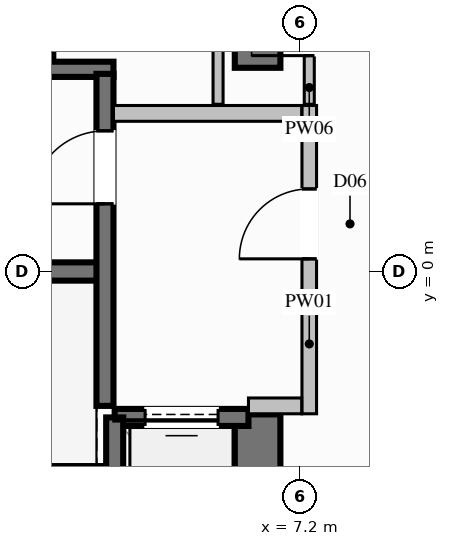
"""IFC4 building model, lengths in metres.
Left out: names, types, materials, properties, quantities, classifications, styles, units other than length and angle.
Written with IfcOpenShell. Run it as: python <this file> out.ifc"""

import sys

from ifc_helpers import new_model, si_unit, direction, frame, frame_2d, origin, place, context, subcontext, project, spatial, rectangle, extrude, element, fill, save


model = new_model("IFC4")
c1 = context("Model", 3, precision=1e-05, world=origin(), true_north=direction((0.0, 1.0)))
c2 = subcontext(c1, "Body", "Model", "MODEL_VIEW")
j1 = project(units=[si_unit("LENGTHUNIT", "METRE"), si_unit("PLANEANGLEUNIT", "RADIAN")], contexts=[c1])
p1 = place(None, origin())
s1 = spatial("IfcSite", under=j1, at=p1, CompositionType="ELEMENT")
p2 = place(p1, origin())
s2 = spatial("IfcBuilding", under=s1, at=p2, CompositionType="ELEMENT")
p3 = place(p2, frame((0.0, 0.0, 71.6)))
s3 = spatial("IfcBuildingStorey", under=s2, at=p3, CompositionType="ELEMENT", Elevation=71.6)
p4 = place(p3, frame((-3.99, 0.0, 0.0), z_axis=(0.0, 0.0, 1.0), x_axis=(1.0, 0.0, 0.0)))
e1 = element("IfcWall", 1, at=p4, inside=s3, PredefinedType="SHEAR", context=c2, shape_type="SweptSolid", body=[
    extrude(rectangle(XDim=7.98, YDim=0.3, at=frame_2d((3.99, 0.0))), origin(), (0.0, 0.0, 1.0), 3.6),
])
for number, where, z_axis, x_axis in (
    (2, (-4.13, -3.325, 0.0), (0.0, 0.0, 1.0), (1.0, 0.0, 0.0)),
    (3, (-4.13, 3.325, 0.0), (0.0, 0.0, 1.0), (1.0, 0.0, 0.0)),
):
    element("IfcWall", number, at=place(p3, frame(where, z_axis=z_axis, x_axis=x_axis)), inside=s3, PredefinedType="SOLIDWALL", context=c2, shape_type="SweptSolid", body=[
        extrude(rectangle(XDim=8.26, YDim=0.25, at=frame_2d((4.13, 0.0))), origin(), (0.0, 0.0, 1.0), 3.6),
    ])
p5 = place(p3, frame((6.5, -6.475, 0.0), z_axis=(0.0, 0.0, 1.0), x_axis=(0.0, 1.0, 0.0)))
e4 = element("IfcWall", 4, at=p5, inside=s3, PredefinedType="SHEAR", context=c2, shape_type="SweptSolid", body=[
    extrude(rectangle(XDim=4.125, YDim=0.75, at=frame_2d((2.062, 0.0))), origin(), (0.0, 0.0, 1.0), 3.6),
])
p6 = place(p3, frame((6.5, 3.35, 0.0), z_axis=(0.0, 0.0, 1.0), x_axis=(0.0, 1.0, 0.0)))
e5 = element("IfcWall", 5, at=p6, inside=s3, PredefinedType="SHEAR", context=c2, shape_type="SweptSolid", body=[
    extrude(rectangle(XDim=3.125, YDim=0.75, at=frame_2d((1.562, 0.0))), origin(), (0.0, 0.0, 1.0), 3.6),
])
p7 = place(p3, frame((3.0, 3.5, 0.0), z_axis=(0.0, 0.0, 1.0), x_axis=(0.0, 1.0, 0.0)))
e6 = element("IfcWall", 6, at=p7, inside=s3, PredefinedType="SOLIDWALL", context=c2, shape_type="SweptSolid", body=[
    extrude(rectangle(XDim=2.5, YDim=0.28, at=frame_2d((1.25, 0.0))), origin(), (0.0, 0.0, 1.0), 3.34),
])
p8 = place(p3, frame((6.35, -2.4, 0.0), z_axis=(0.0, 0.0, 1.0), x_axis=(-1.0, 0.0, 0.0)))
e7 = element("IfcWall", 7, at=p8, inside=s3, PredefinedType="SOLIDWALL", context=c2, shape_type="SweptSolid", body=[
    extrude(rectangle(XDim=2.2, YDim=0.28, at=frame_2d((1.1, 0.0))), origin(), (0.0, 0.0, 1.0), 3.34),
])
p9 = place(p8, frame((0.5, 0.0, 0.0)))
e8 = element("IfcOpeningElement", 8, at=p9, cuts=e7, PredefinedType="OPENING", context=c2, shape_type="SweptSolid", body=[
    extrude(rectangle(XDim=1.2, YDim=2.2, at=frame_2d((0.6, 1.1))), frame((0.0, 0.15, 0.0), z_axis=(0.0, -1.0, 0.0), x_axis=(1.0, 0.0, 0.0)), (0.0, 0.0, 1.0), 0.3),
])
p10 = place(p3, frame((4.15, -2.4, 0.0), z_axis=(0.0, 0.0, 1.0), x_axis=(0.0, -1.0, 0.0)))
e9 = element("IfcWall", 9, at=p10, inside=s3, PredefinedType="SOLIDWALL", context=c2, shape_type="SweptSolid", body=[
    extrude(rectangle(XDim=2.7, YDim=0.28, at=frame_2d((1.35, 0.0))), origin(), (0.0, 0.0, 1.0), 3.34),
])
p11 = place(p3, frame((3.99, -2.21, 0.0), z_axis=(0.0, 0.0, 1.0), x_axis=(0.0, 1.0, 0.0)))
e10 = element("IfcWall", 10, at=p11, inside=s3, PredefinedType="SOLIDWALL", context=c2, shape_type="SweptSolid", body=[
    extrude(rectangle(XDim=5.46, YDim=0.28, at=frame_2d((2.73, 0.0))), origin(), (0.0, 0.0, 1.0), 3.34),
])
p12 = place(p11, frame((3.323, 0.0, 0.0)))
e11 = element("IfcOpeningElement", 11, at=p12, cuts=e10, PredefinedType="OPENING", context=c2, shape_type="SweptSolid", body=[
    extrude(rectangle(XDim=1.2, YDim=2.2, at=frame_2d((0.6, 1.1))), frame((0.0, 0.15, 0.0), z_axis=(0.0, -1.0, 0.0), x_axis=(1.0, 0.0, 0.0)), (0.0, 0.0, 1.0), 0.3),
])
p13 = place(p3, frame((7.35, -2.34, 0.0), z_axis=(0.0, 0.0, 1.0), x_axis=(0.0, 1.0, 0.0)))
e12 = element("IfcWall", 12, at=p13, inside=s3, PredefinedType="PARTITIONING", context=c2, shape_type="SweptSolid", body=[
    extrude(rectangle(XDim=5.07, YDim=0.24, at=frame_2d((2.535, 0.0))), origin(), (0.0, 0.0, 1.0), 2.425),
])
p14 = place(p13, frame((2.548, 0.0, 0.0)))
e13 = element("IfcOpeningElement", 13, at=p14, cuts=e12, PredefinedType="OPENING", context=c2, shape_type="SweptSolid", body=[
    extrude(rectangle(XDim=1.15, YDim=2.2, at=frame_2d((0.575, 1.1))), frame((0.0, 0.13, 0.0), z_axis=(0.0, -1.0, 0.0), x_axis=(1.0, 0.0, 0.0)), (0.0, 0.0, 1.0), 0.26),
])
p15 = place(p3, frame((6.35, -2.21, 0.0), z_axis=(0.0, 0.0, 1.0), x_axis=(1.0, 0.0, 0.0)))
e14 = element("IfcWall", 14, at=p15, inside=s3, PredefinedType="PARTITIONING", context=c2, shape_type="SweptSolid", body=[
    extrude(rectangle(XDim=0.875, YDim=0.26, at=frame_2d((0.438, 0.0))), origin(), (0.0, 0.0, 1.0), 3.34),
])
p16 = place(p3, frame((4.13, 2.6, 0.0), z_axis=(0.0, 0.0, 1.0), x_axis=(1.0, 0.0, 0.0)))
e15 = element("IfcWall", 15, at=p16, inside=s3, PredefinedType="PARTITIONING", context=c2, shape_type="SweptSolid", body=[
    extrude(rectangle(XDim=3.095, YDim=0.26, at=frame_2d((1.548, 0.0))), origin(), (0.0, 0.0, 1.0), 3.34),
])
p17 = place(p3, frame((7.35, 2.75, 0.0), z_axis=(0.0, 0.0, 1.0), x_axis=(0.0, 1.0, 0.0)))
e16 = element("IfcWall", 16, at=p17, inside=s3, PredefinedType="PARTITIONING", context=c2, shape_type="SweptSolid", body=[
    extrude(rectangle(XDim=2.55, YDim=0.165, at=frame_2d((1.275, 0.0))), origin(), (0.0, 0.0, 1.0), 3.34),
])
p18 = place(p17, frame((0.8, 0.0, 0.0)))
e17 = element("IfcOpeningElement", 17, at=p18, cuts=e16, PredefinedType="OPENING", context=c2, shape_type="SweptSolid", body=[
    extrude(rectangle(XDim=0.95, YDim=2.1, at=frame_2d((0.475, 1.05))), frame((0.0, 0.093, 0.0), z_axis=(0.0, -1.0, 0.0), x_axis=(1.0, 0.0, 0.0)), (0.0, 0.0, 1.0), 0.185),
])
p19 = place(p3, frame((5.85, 5.3, 0.0), z_axis=(0.0, 0.0, 1.0), x_axis=(0.0, -1.0, 0.0)))
e18 = element("IfcWall", 18, at=p19, inside=s3, PredefinedType="PARTITIONING", context=c2, shape_type="SweptSolid", body=[
    extrude(rectangle(XDim=2.55, YDim=0.165, at=frame_2d((1.275, 0.0))), origin(), (0.0, 0.0, 1.0), 2.425),
])
p20 = place(p9, origin())
e19 = element("IfcDoor", 19, at=p20, inside=s3, OperationType="SLIDING_TO_LEFT", PredefinedType="DOOR", context=c2, shape_type="SweptSolid", body=[
    extrude(rectangle(XDim=1.2, YDim=2.2, at=frame_2d((0.6, 1.1))), frame((0.0, 0.025, 0.0), z_axis=(0.0, -1.0, 0.0), x_axis=(1.0, 0.0, 0.0)), (0.0, 0.0, 1.0), 0.05),
])
fill(e8, e19)
p21 = place(p12, origin())
e20 = element("IfcDoor", 20, at=p21, inside=s3, OperationType="SINGLE_SWING_LEFT", PredefinedType="DOOR", context=c2, shape_type="SweptSolid", body=[
    extrude(rectangle(XDim=1.2, YDim=2.2, at=frame_2d((0.6, 1.1))), frame((0.0, 0.025, 0.0), z_axis=(0.0, -1.0, 0.0), x_axis=(1.0, 0.0, 0.0)), (0.0, 0.0, 1.0), 0.05),
])
fill(e11, e20)
p22 = place(p14, origin())
e21 = element("IfcDoor", 21, at=p22, inside=s3, OperationType="SINGLE_SWING_LEFT", PredefinedType="DOOR", context=c2, shape_type="SweptSolid", body=[
    extrude(rectangle(XDim=1.15, YDim=2.2, at=frame_2d((0.575, 1.1))), frame((0.0, 0.025, 0.0), z_axis=(0.0, -1.0, 0.0), x_axis=(1.0, 0.0, 0.0)), (0.0, 0.0, 1.0), 0.05),
])
fill(e13, e21)
p23 = place(p18, origin())
e22 = element("IfcDoor", 22, at=p23, inside=s3, OperationType="SINGLE_SWING_LEFT", PredefinedType="DOOR", context=c2, shape_type="SweptSolid", body=[
    extrude(rectangle(XDim=0.95, YDim=2.1, at=frame_2d((0.475, 1.05))), frame((0.0, 0.025, 0.0), z_axis=(0.0, -1.0, 0.0), x_axis=(1.0, 0.0, 0.0)), (0.0, 0.0, 1.0), 0.05),
])
fill(e17, e22)
save(model, sys.argv[1])
